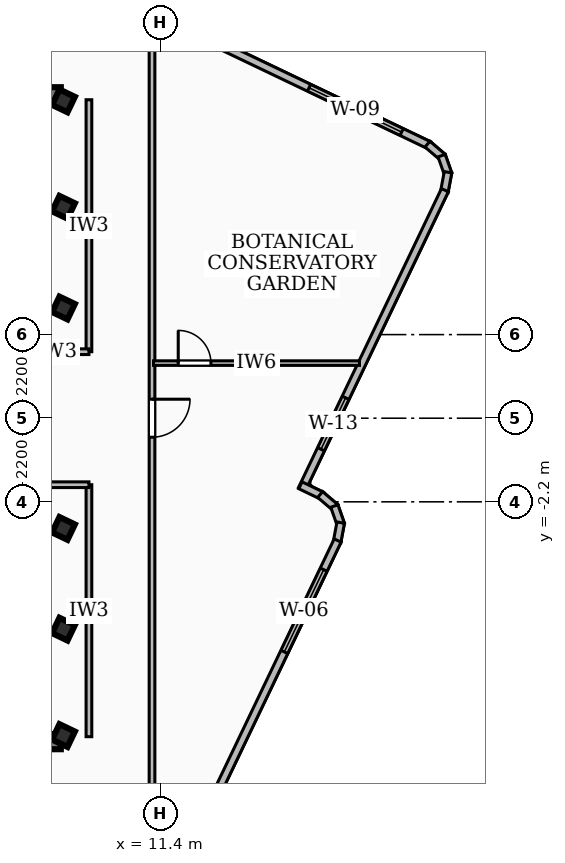
"""IFC4 building model, lengths in metres.
Left out: names, types, materials, properties, quantities, classifications, styles, units other than length and angle.
Written with IfcOpenShell. Run it as: python <this file> out.ifc"""

import sys

from ifc_helpers import new_model, si_unit, direction, frame, frame_2d, origin, origin_2d, place, context, subcontext, project, spatial, rectangle, hollow_rectangle, extrude, element, fill, save


model = new_model("IFC4")
c1 = context("Model", 3, precision=1e-05, world=origin(), true_north=direction((0.0, 1.0)))
c2 = subcontext(c1, "Body", "Model", "MODEL_VIEW")
j1 = project(units=[si_unit("LENGTHUNIT", "METRE"), si_unit("PLANEANGLEUNIT", "RADIAN")], contexts=[c1])
p1 = place(None, origin())
s1 = spatial("IfcSite", under=j1, at=p1, CompositionType="ELEMENT")
p2 = place(p1, origin())
s2 = spatial("IfcBuilding", under=s1, at=p2, CompositionType="ELEMENT")
p3 = place(p2, frame((0.0, 0.0, 293.4)))
s3 = spatial("IfcBuildingStorey", under=s2, at=p3, CompositionType="ELEMENT", Elevation=293.4)
for number, where, z_axis, x_axis in (
    (1, (-8.78, 8.51, 0.0), (0.0, 0.0, 1.0), (1.0, 0.0, 0.0)),
    (2, (8.78, -8.51, 0.0), (0.0, 0.0, 1.0), (-1.0, 0.0, 0.0)),
):
    element("IfcWall", number, at=place(p3, frame(where, z_axis=z_axis, x_axis=x_axis)), inside=s3, PredefinedType="SHEAR", context=c2, shape_type="SweptSolid", body=[
        extrude(rectangle(XDim=17.56, YDim=0.4, at=frame_2d((8.78, 0.0))), origin(), (0.0, 0.0, 1.0), 3.84),
    ])
for number, where, z_axis, x_axis in (
    (3, (8.85, -5.55, 0.0), (0.0, 0.0, 1.0), (0.431, 0.902, 0.0)),
    (4, (8.85, -2.9, 0.0), (0.0, 0.0, 1.0), (0.431, 0.902, 0.0)),
    (5, (8.85, 2.9, 0.0), (0.0, 0.0, 1.0), (0.431, 0.902, 0.0)),
    (6, (8.85, 5.55, 0.0), (0.0, 0.0, 1.0), (0.431, 0.902, 0.0)),
    (7, (8.85, -8.35, 0.0), (0.0, 0.0, 1.0), (0.431, 0.902, 0.0)),
    (8, (8.85, 8.35, 0.0), (0.0, 0.0, 1.0), (0.431, 0.902, 0.0)),
):
    element("IfcColumn", number, at=place(p3, frame(where, z_axis=z_axis, x_axis=x_axis)), inside=s3, PredefinedType="COLUMN", context=c2, shape_type="SweptSolid", body=[
        extrude(hollow_rectangle(XDim=0.45, YDim=0.45, WallThickness=0.022, at=origin_2d()), origin(), (0.0, 0.0, 1.0), 4.14),
    ])
p4 = place(p3, frame((10.597, 10.95, 0.0), z_axis=(0.0, 0.0, 1.0), x_axis=(0.902111970189, -0.431502019975, 0.0)))
e9 = element("IfcWall", 9, at=p4, inside=s3, PredefinedType="SOLIDWALL", context=c2, shape_type="SweptSolid", body=[
    extrude(rectangle(XDim=8.727, YDim=0.2, at=frame_2d((4.364, 0.0))), origin(), (0.0, 0.0, 1.0), 3.84),
])
p5 = place(p4, frame((5.227, 0.0, 0.85)))
e10 = element("IfcOpeningElement", 10, at=p5, cuts=e9, PredefinedType="OPENING", context=c2, shape_type="SweptSolid", body=[
    extrude(rectangle(XDim=2.7, YDim=1.65, at=frame_2d((1.35, 0.825))), frame((0.0, 0.11, 0.0), z_axis=(0.0, -1.0, 0.0), x_axis=(1.0, 0.0, 0.0)), (0.0, 0.0, 1.0), 0.22),
])
p6 = place(p3, frame((18.428, 7.211, 0.0), z_axis=(0.0, 0.0, 1.0), x_axis=(0.759943910462, -0.649988656018, 0.0)))
e11 = element("IfcWall", 11, at=p6, inside=s3, PredefinedType="SOLIDWALL", context=c2, shape_type="SweptSolid", body=[
    extrude(rectangle(XDim=0.526, YDim=0.2, at=frame_2d((0.263, 0.0))), origin(), (0.0, 0.0, 1.0), 3.84),
])
p7 = place(p3, frame((18.801, 6.909, 0.0), z_axis=(0.0, 0.0, 1.0), x_axis=(0.331828095813, -0.943339872384, 0.0)))
e12 = element("IfcWall", 12, at=p7, inside=s3, PredefinedType="SOLIDWALL", context=c2, shape_type="SweptSolid", body=[
    extrude(rectangle(XDim=0.515, YDim=0.2, at=frame_2d((0.258, 0.0))), origin(), (0.0, 0.0, 1.0), 3.84),
])
p8 = place(p3, frame((18.969, 6.472, 0.0), z_axis=(0.0, 0.0, 1.0), x_axis=(-0.185012762142, -0.982736118113, 0.0)))
e13 = element("IfcWall", 13, at=p8, inside=s3, PredefinedType="SOLIDWALL", context=c2, shape_type="SweptSolid", body=[
    extrude(rectangle(XDim=0.529, YDim=0.2, at=frame_2d((0.265, 0.0))), origin(), (0.0, 0.0, 1.0), 3.84),
])
p9 = place(p3, frame((18.887, 6.0, 0.0), z_axis=(0.0, 0.0, 1.0), x_axis=(-0.4314545073, -0.902134695115, 0.0)))
e14 = element("IfcWall", 14, at=p9, inside=s3, PredefinedType="SOLIDWALL", context=c2, shape_type="SweptSolid", body=[
    extrude(rectangle(XDim=8.726, YDim=0.2, at=frame_2d((4.363, 0.0))), origin(), (0.0, 0.0, 1.0), 3.84),
])
p10 = place(p9, frame((6.056, 0.0, 0.85)))
e15 = element("IfcOpeningElement", 15, at=p10, cuts=e14, PredefinedType="OPENING", context=c2, shape_type="SweptSolid", body=[
    extrude(rectangle(XDim=1.5, YDim=1.8, at=frame_2d((0.75, 0.9))), frame((0.0, 0.11, 0.0), z_axis=(0.0, -1.0, 0.0), x_axis=(1.0, 0.0, 0.0)), (0.0, 0.0, 1.0), 0.22),
])
p11 = place(p3, frame((15.085, -1.765, 0.0), z_axis=(0.0, 0.0, 1.0), x_axis=(0.901069775832, -0.433674139282, 0.0)))
e16 = element("IfcWall", 16, at=p11, inside=s3, PredefinedType="SOLIDWALL", context=c2, shape_type="SweptSolid", body=[
    extrude(rectangle(XDim=0.623, YDim=0.2, at=frame_2d((0.311, 0.0))), origin(), (0.0, 0.0, 1.0), 3.84),
])
p12 = place(p3, frame((15.604, -2.008, 0.0), z_axis=(0.0, 0.0, 1.0), x_axis=(0.760726296162, -0.649072802024, 0.0)))
e17 = element("IfcWall", 17, at=p12, inside=s3, PredefinedType="SOLIDWALL", context=c2, shape_type="SweptSolid", body=[
    extrude(rectangle(XDim=0.527, YDim=0.2, at=frame_2d((0.263, 0.0))), origin(), (0.0, 0.0, 1.0), 3.84),
])
p13 = place(p3, frame((15.978, -2.31, 0.0), z_axis=(0.0, 0.0, 1.0), x_axis=(0.330139130112, -0.943932282936, 0.0)))
e18 = element("IfcWall", 18, at=p13, inside=s3, PredefinedType="SOLIDWALL", context=c2, shape_type="SweptSolid", body=[
    extrude(rectangle(XDim=0.515, YDim=0.2, at=frame_2d((0.257, 0.0))), origin(), (0.0, 0.0, 1.0), 3.84),
])
p14 = place(p3, frame((16.145, -2.747, 0.0), z_axis=(0.0, 0.0, 1.0), x_axis=(-0.183562644201, -0.983008014033, 0.0)))
e19 = element("IfcWall", 19, at=p14, inside=s3, PredefinedType="SOLIDWALL", context=c2, shape_type="SweptSolid", body=[
    extrude(rectangle(XDim=0.528, YDim=0.2, at=frame_2d((0.264, 0.0))), origin(), (0.0, 0.0, 1.0), 3.84),
])
p15 = place(p3, frame((16.064, -3.218, 0.0), z_axis=(0.0, 0.0, 1.0), x_axis=(-0.431506971387, -0.902109601791, 0.0)))
e20 = element("IfcWall", 20, at=p15, inside=s3, PredefinedType="SOLIDWALL", context=c2, shape_type="SweptSolid", body=[
    extrude(rectangle(XDim=8.056, YDim=0.2, at=frame_2d((4.028, 0.0))), origin(), (0.0, 0.0, 1.0), 3.84),
])
p16 = place(p15, frame((0.85, 0.0, 0.85)))
e21 = element("IfcOpeningElement", 21, at=p16, cuts=e20, PredefinedType="OPENING", context=c2, shape_type="SweptSolid", body=[
    extrude(rectangle(XDim=2.4, YDim=1.85, at=frame_2d((1.2, 0.925))), frame((0.0, 0.11, 0.0), z_axis=(0.0, -1.0, 0.0), x_axis=(1.0, 0.0, 0.0)), (0.0, 0.0, 1.0), 0.22),
])
p17 = place(p3, frame((9.52, 1.75, 0.0), z_axis=(0.0, 0.0, 1.0), x_axis=(0.0, 1.0, 0.0)))
e22 = element("IfcWall", 22, at=p17, inside=s3, PredefinedType="PARTITIONING", context=c2, shape_type="SweptSolid", body=[
    extrude(rectangle(XDim=6.63, YDim=0.15, at=frame_2d((3.315, 0.0))), origin(), (0.0, 0.0, 1.0), 3.84),
])
p18 = place(p3, frame((7.85, 1.75, 0.0), z_axis=(0.0, 0.0, 1.0), x_axis=(1.0, 0.0, 0.0)))
e23 = element("IfcWall", 23, at=p18, inside=s3, PredefinedType="PARTITIONING", context=c2, shape_type="SweptSolid", body=[
    extrude(rectangle(XDim=1.67, YDim=0.15, at=frame_2d((0.835, 0.0))), origin(), (0.0, 0.0, 1.0), 3.07),
])
p19 = place(p3, frame((9.52, -8.38, 0.0), z_axis=(0.0, 0.0, 1.0), x_axis=(0.0, 1.0, 0.0)))
e24 = element("IfcWall", 24, at=p19, inside=s3, PredefinedType="PARTITIONING", context=c2, shape_type="SweptSolid", body=[
    extrude(rectangle(XDim=6.63, YDim=0.15, at=frame_2d((3.315, 0.0))), origin(), (0.0, 0.0, 1.0), 3.21),
])
p20 = place(p3, frame((7.85, -1.75, 0.0), z_axis=(0.0, 0.0, 1.0), x_axis=(1.0, 0.0, 0.0)))
e25 = element("IfcWall", 25, at=p20, inside=s3, PredefinedType="PARTITIONING", context=c2, shape_type="SweptSolid", body=[
    extrude(rectangle(XDim=1.67, YDim=0.15, at=frame_2d((0.835, 0.0))), origin(), (0.0, 0.0, 1.0), 3.07),
])
p21 = place(p3, frame((11.18, 10.599, 0.0), z_axis=(0.0, 0.0, 1.0), x_axis=(0.0, -1.0, 0.0)))
e26 = element("IfcWall", 26, at=p21, inside=s3, PredefinedType="PARTITIONING", context=c2, shape_type="SweptSolid", body=[
    extrude(rectangle(XDim=21.322, YDim=0.15, at=frame_2d((10.661, 0.0))), origin(), (0.0, 0.0, 1.0), 3.84),
])
p22 = place(p21, frame((10.099, 0.0, 0.0)))
e27 = element("IfcOpeningElement", 27, at=p22, cuts=e26, PredefinedType="OPENING", context=c2, shape_type="SweptSolid", body=[
    extrude(rectangle(XDim=1.0, YDim=2.1, at=frame_2d((0.5, 1.05))), frame((0.0, 0.085, 0.0), z_axis=(0.0, -1.0, 0.0), x_axis=(1.0, 0.0, 0.0)), (0.0, 0.0, 1.0), 0.17),
])
p23 = place(p3, frame((11.22, 1.45, 0.0), z_axis=(0.0, 0.0, 1.0), x_axis=(1.0, 0.0, 0.0)))
e28 = element("IfcWall", 28, at=p23, inside=s3, PredefinedType="PARTITIONING", context=c2, shape_type="SweptSolid", body=[
    extrude(rectangle(XDim=5.419, YDim=0.12, at=frame_2d((2.709, 0.0))), origin(), (0.0, 0.0, 1.0), 3.84),
])
p24 = place(p23, frame((0.65, 0.0, 0.0)))
e29 = element("IfcOpeningElement", 29, at=p24, cuts=e28, PredefinedType="OPENING", context=c2, shape_type="SweptSolid", body=[
    extrude(rectangle(XDim=0.86, YDim=2.04, at=frame_2d((0.43, 1.02))), frame((0.0, 0.07, 0.0), z_axis=(0.0, -1.0, 0.0), x_axis=(1.0, 0.0, 0.0)), (0.0, 0.0, 1.0), 0.14),
])
p25 = place(p5, origin())
e30 = element("IfcWindow", 30, at=p25, inside=s3, PartitioningType="SINGLE_PANEL", PredefinedType="WINDOW", context=c2, shape_type="SweptSolid", body=[
    extrude(rectangle(XDim=2.7, YDim=1.65, at=frame_2d((1.35, 0.825))), frame((0.0, 0.03, 0.0), z_axis=(0.0, -1.0, 0.0), x_axis=(1.0, 0.0, 0.0)), (0.0, 0.0, 1.0), 0.06),
])
fill(e10, e30)
p26 = place(p10, origin())
e31 = element("IfcWindow", 31, at=p26, inside=s3, PartitioningType="SINGLE_PANEL", PredefinedType="WINDOW", context=c2, shape_type="SweptSolid", body=[
    extrude(rectangle(XDim=1.5, YDim=1.8, at=frame_2d((0.75, 0.9))), frame((0.0, 0.03, 0.0), z_axis=(0.0, -1.0, 0.0), x_axis=(1.0, 0.0, 0.0)), (0.0, 0.0, 1.0), 0.06),
])
fill(e15, e31)
p27 = place(p16, origin())
e32 = element("IfcWindow", 32, at=p27, inside=s3, PartitioningType="SINGLE_PANEL", PredefinedType="WINDOW", context=c2, shape_type="SweptSolid", body=[
    extrude(rectangle(XDim=2.4, YDim=1.85, at=frame_2d((1.2, 0.925))), frame((0.0, 0.03, 0.0), z_axis=(0.0, -1.0, 0.0), x_axis=(1.0, 0.0, 0.0)), (0.0, 0.0, 1.0), 0.06),
])
fill(e21, e32)
p28 = place(p22, origin())
e33 = element("IfcDoor", 33, at=p28, inside=s3, OperationType="SINGLE_SWING_LEFT", PredefinedType="DOOR", context=c2, shape_type="SweptSolid", body=[
    extrude(rectangle(XDim=1.0, YDim=2.1, at=frame_2d((0.5, 1.05))), frame((0.0, 0.025, 0.0), z_axis=(0.0, -1.0, 0.0), x_axis=(1.0, 0.0, 0.0)), (0.0, 0.0, 1.0), 0.05),
])
fill(e27, e33)
p29 = place(p24, origin())
e34 = element("IfcDoor", 34, at=p29, inside=s3, OperationType="SINGLE_SWING_LEFT", PredefinedType="DOOR", context=c2, shape_type="SweptSolid", body=[
    extrude(rectangle(XDim=0.86, YDim=2.04, at=frame_2d((0.43, 1.02))), frame((0.0, 0.025, 0.0), z_axis=(0.0, -1.0, 0.0), x_axis=(1.0, 0.0, 0.0)), (0.0, 0.0, 1.0), 0.05),
])
fill(e29, e34)
save(model, sys.argv[1])
